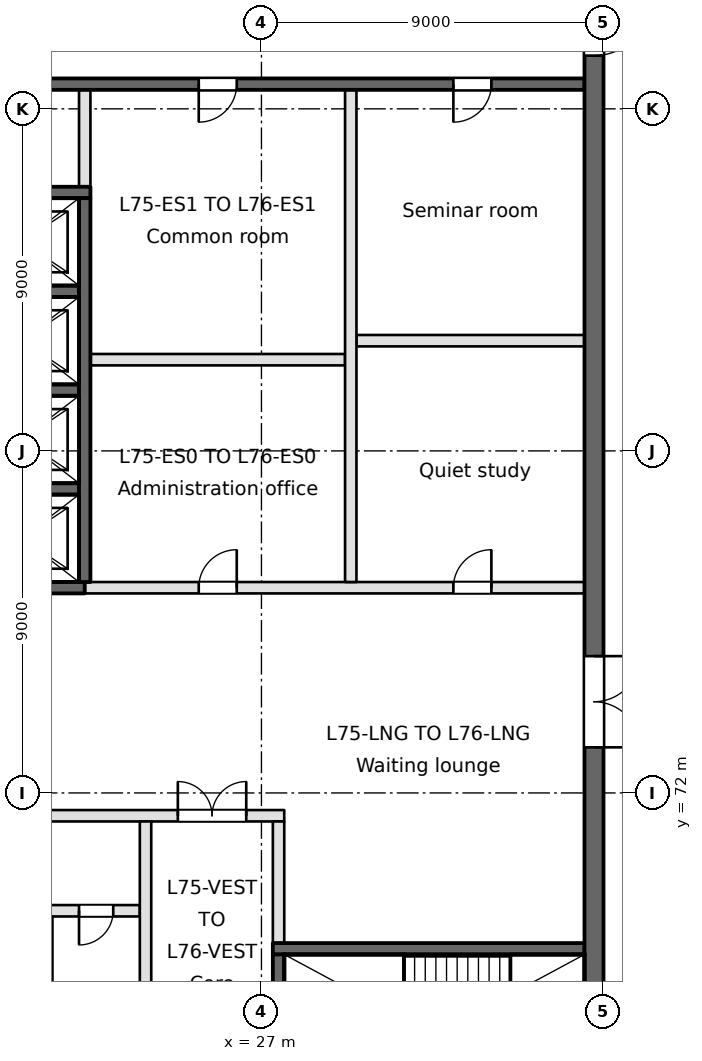
"""IFC4 building model, lengths in metres.
Left out: names, types, materials, properties, quantities, classifications, styles, units other than length and angle.
Written with IfcOpenShell. Run it as: python <this file> out.ifc"""

import sys

from ifc_helpers import new_model, si_unit, direction, frame, frame_2d, origin, place, context, subcontext, project, spatial, rectangle, extrude, element, fill, save


model = new_model("IFC4")
c1 = context("Model", 3, precision=1e-05, world=origin(), true_north=direction((0.0, 1.0)))
c2 = subcontext(c1, "Body", "Model", "MODEL_VIEW")
j1 = project(units=[si_unit("LENGTHUNIT", "METRE"), si_unit("PLANEANGLEUNIT", "RADIAN")], contexts=[c1])
p1 = place(None, origin())
s1 = spatial("IfcSite", under=j1, at=p1, CompositionType="ELEMENT")
p2 = place(p1, origin())
s2 = spatial("IfcBuilding", under=s1, at=p2, CompositionType="ELEMENT")
p3 = place(p2, frame((0.0, 0.0, 291.9)))
s3 = spatial("IfcBuildingStorey", under=s2, at=p3, CompositionType="ELEMENT", Elevation=291.9)
p4 = place(p3, frame((27.3, 67.9, -0.4), z_axis=(0.0, 0.0, 1.0), x_axis=(1.0, 0.0, 0.0)))
e1 = element("IfcWall", 1, at=p4, inside=s3, PredefinedType="SOLIDWALL", context=c2, shape_type="SweptSolid", body=[
    extrude(rectangle(XDim=8.2, YDim=0.3, at=frame_2d((4.1, 0.0))), origin(), (0.0, 0.0, 1.0), 3.7),
])
p5 = place(p3, frame((10.1, 68.9, 0.0), z_axis=(0.0, 0.0, 1.0), x_axis=(1.0, 0.0, 0.0)))
e2 = element("IfcWall", 2, at=p5, inside=s3, PredefinedType="PARTITIONING", context=c2, shape_type="SweptSolid", body=[
    extrude(rectangle(XDim=13.7, YDim=0.3, at=frame_2d((6.85, 0.0))), origin(), (0.0, 0.0, 1.0), 3.3),
])
p6 = place(p5, frame((1.25, 0.0, 0.0)))
e3 = element("IfcOpeningElement", 3, at=p6, cuts=e2, PredefinedType="OPENING", context=c2, shape_type="SweptSolid", body=[
    extrude(rectangle(XDim=0.9, YDim=2.1, at=frame_2d((0.45, 1.05))), frame((0.0, 0.15, 0.0), z_axis=(0.0, -1.0, 0.0), x_axis=(1.0, 0.0, 0.0)), (0.0, 0.0, 1.0), 0.3),
])
p7 = place(p5, frame((5.0, 0.0, 0.0)))
e4 = element("IfcOpeningElement", 4, at=p7, cuts=e2, PredefinedType="OPENING", context=c2, shape_type="SweptSolid", body=[
    extrude(rectangle(XDim=0.9, YDim=2.1, at=frame_2d((0.45, 1.05))), frame((0.0, 0.15, 0.0), z_axis=(0.0, -1.0, 0.0), x_axis=(1.0, 0.0, 0.0)), (0.0, 0.0, 1.0), 0.3),
])
p8 = place(p5, frame((8.8, 0.0, 0.0)))
e5 = element("IfcOpeningElement", 5, at=p8, cuts=e2, PredefinedType="OPENING", context=c2, shape_type="SweptSolid", body=[
    extrude(rectangle(XDim=1.0, YDim=2.1, at=frame_2d((0.5, 1.05))), frame((0.0, 0.15, 0.0), z_axis=(0.0, -1.0, 0.0), x_axis=(1.0, 0.0, 0.0)), (0.0, 0.0, 1.0), 0.3),
])
p9 = place(p5, frame((12.1, 0.0, 0.0)))
e6 = element("IfcOpeningElement", 6, at=p9, cuts=e2, PredefinedType="OPENING", context=c2, shape_type="SweptSolid", body=[
    extrude(rectangle(XDim=0.9, YDim=2.1, at=frame_2d((0.45, 1.05))), frame((0.0, 0.15, 0.0), z_axis=(0.0, -1.0, 0.0), x_axis=(1.0, 0.0, 0.0)), (0.0, 0.0, 1.0), 0.3),
])
p10 = place(p3, frame((9.95, 71.4, 0.0), z_axis=(0.0, 0.0, 1.0), x_axis=(1.0, 0.0, 0.0)))
e7 = element("IfcWall", 7, at=p10, inside=s3, PredefinedType="PARTITIONING", context=c2, shape_type="SweptSolid", body=[
    extrude(rectangle(XDim=17.65, YDim=0.3, at=frame_2d((8.825, 0.0))), origin(), (0.0, 0.0, 1.0), 3.3),
])
p11 = place(p10, frame((14.85, 0.0, 0.0)))
e8 = element("IfcOpeningElement", 8, at=p11, cuts=e7, PredefinedType="OPENING", context=c2, shape_type="SweptSolid", body=[
    extrude(rectangle(XDim=1.8, YDim=2.1, at=frame_2d((0.9, 1.05))), frame((0.0, 0.15, 0.0), z_axis=(0.0, -1.0, 0.0), x_axis=(1.0, 0.0, 0.0)), (0.0, 0.0, 1.0), 0.3),
])
p12 = place(p10, frame((6.4, 0.0, 0.0)))
e9 = element("IfcOpeningElement", 9, at=p12, cuts=e7, PredefinedType="OPENING", context=c2, shape_type="SweptSolid", body=[
    extrude(rectangle(XDim=1.2, YDim=2.1, at=frame_2d((0.6, 1.05))), frame((0.0, 0.15, 0.0), z_axis=(0.0, -1.0, 0.0), x_axis=(1.0, 0.0, 0.0)), (0.0, 0.0, 1.0), 0.3),
])
p13 = place(p3, frame((0.9, 77.4, -0.4), z_axis=(0.0, 0.0, 1.0), x_axis=(1.0, 0.0, 0.0)))
e10 = element("IfcWall", 10, at=p13, inside=s3, PredefinedType="SOLIDWALL", context=c2, shape_type="SweptSolid", body=[
    extrude(rectangle(XDim=21.45, YDim=0.3, at=frame_2d((10.725, 0.0))), origin(), (0.0, 0.0, 1.0), 3.7),
])
p14 = place(p13, frame((15.15, 0.0, 0.4)))
e11 = element("IfcOpeningElement", 11, at=p14, cuts=e10, PredefinedType="OPENING", context=c2, shape_type="SweptSolid", body=[
    extrude(rectangle(XDim=1.8, YDim=2.1, at=frame_2d((0.9, 1.05))), frame((0.0, 0.15, 0.0), z_axis=(0.0, -1.0, 0.0), x_axis=(1.0, 0.0, 0.0)), (0.0, 0.0, 1.0), 0.3),
])
p15 = place(p13, frame((2.35, 0.0, 0.4)))
e12 = element("IfcOpeningElement", 12, at=p15, cuts=e10, PredefinedType="OPENING", context=c2, shape_type="SweptSolid", body=[
    extrude(rectangle(XDim=1.0, YDim=2.1, at=frame_2d((0.5, 1.05))), frame((0.0, 0.15, 0.0), z_axis=(0.0, -1.0, 0.0), x_axis=(1.0, 0.0, 0.0)), (0.0, 0.0, 1.0), 0.3),
])
p16 = place(p13, frame((7.75, 0.0, 0.4)))
e13 = element("IfcOpeningElement", 13, at=p16, cuts=e10, PredefinedType="OPENING", context=c2, shape_type="SweptSolid", body=[
    extrude(rectangle(XDim=1.0, YDim=2.1, at=frame_2d((0.5, 1.05))), frame((0.0, 0.15, 0.0), z_axis=(0.0, -1.0, 0.0), x_axis=(1.0, 0.0, 0.0)), (0.0, 0.0, 1.0), 0.3),
])
p17 = place(p3, frame((22.35, 77.4, 0.0), z_axis=(0.0, 0.0, 1.0), x_axis=(1.0, 0.0, 0.0)))
e14 = element("IfcWall", 14, at=p17, inside=s3, PredefinedType="PARTITIONING", context=c2, shape_type="SweptSolid", body=[
    extrude(rectangle(XDim=13.15, YDim=0.3, at=frame_2d((6.575, 0.0))), origin(), (0.0, 0.0, 1.0), 3.3),
])
p18 = place(p17, frame((3.0, 0.0, 0.0)))
e15 = element("IfcOpeningElement", 15, at=p18, cuts=e14, PredefinedType="OPENING", context=c2, shape_type="SweptSolid", body=[
    extrude(rectangle(XDim=1.0, YDim=2.1, at=frame_2d((0.5, 1.05))), frame((0.0, 0.15, 0.0), z_axis=(0.0, -1.0, 0.0), x_axis=(1.0, 0.0, 0.0)), (0.0, 0.0, 1.0), 0.3),
])
p19 = place(p17, frame((9.7, 0.0, 0.0)))
e16 = element("IfcOpeningElement", 16, at=p19, cuts=e14, PredefinedType="OPENING", context=c2, shape_type="SweptSolid", body=[
    extrude(rectangle(XDim=1.0, YDim=2.1, at=frame_2d((0.5, 1.05))), frame((0.0, 0.15, 0.0), z_axis=(0.0, -1.0, 0.0), x_axis=(1.0, 0.0, 0.0)), (0.0, 0.0, 1.0), 0.3),
])
for number, where, z_axis, x_axis in (
    (17, (19.2, 80.0, -0.4), (0.0, 0.0, 1.0), (1.0, 0.0, 0.0)),
    (18, (19.2, 82.6, -0.4), (0.0, 0.0, 1.0), (1.0, 0.0, 0.0)),
):
    element("IfcWall", number, at=place(p3, frame(where, z_axis=z_axis, x_axis=x_axis)), inside=s3, PredefinedType="SOLIDWALL", context=c2, shape_type="SweptSolid", body=[
        extrude(rectangle(XDim=3.0, YDim=0.3, at=frame_2d((1.5, 0.0))), origin(), (0.0, 0.0, 1.0), 3.7),
    ])
p20 = place(p3, frame((22.5, 83.4, 0.0), z_axis=(0.0, 0.0, 1.0), x_axis=(1.0, 0.0, 0.0)))
e19 = element("IfcWall", 19, at=p20, inside=s3, PredefinedType="PARTITIONING", context=c2, shape_type="SweptSolid", body=[
    extrude(rectangle(XDim=6.7, YDim=0.3, at=frame_2d((3.35, 0.0))), origin(), (0.0, 0.0, 1.0), 3.3),
])
p21 = place(p3, frame((29.5, 83.9, 0.0), z_axis=(0.0, 0.0, 1.0), x_axis=(1.0, 0.0, 0.0)))
e20 = element("IfcWall", 20, at=p21, inside=s3, PredefinedType="PARTITIONING", context=c2, shape_type="SweptSolid", body=[
    extrude(rectangle(XDim=6.0, YDim=0.3, at=frame_2d((3.0, 0.0))), origin(), (0.0, 0.0, 1.0), 3.3),
])
p22 = place(p3, frame((19.2, 85.2, -0.4), z_axis=(0.0, 0.0, 1.0), x_axis=(1.0, 0.0, 0.0)))
e21 = element("IfcWall", 21, at=p22, inside=s3, PredefinedType="SOLIDWALL", context=c2, shape_type="SweptSolid", body=[
    extrude(rectangle(XDim=3.0, YDim=0.3, at=frame_2d((1.5, 0.0))), origin(), (0.0, 0.0, 1.0), 3.7),
])
p23 = place(p3, frame((11.4, 87.8, -0.4), z_axis=(0.0, 0.0, 1.0), x_axis=(1.0, 0.0, 0.0)))
e22 = element("IfcWall", 22, at=p23, inside=s3, PredefinedType="SOLIDWALL", context=c2, shape_type="SweptSolid", body=[
    extrude(rectangle(XDim=11.1, YDim=0.3, at=frame_2d((5.55, 0.0))), origin(), (0.0, 0.0, 1.0), 3.7),
])
p24 = place(p3, frame((0.9, 90.65, -0.4), z_axis=(0.0, 0.0, 1.0), x_axis=(1.0, 0.0, 0.0)))
e23 = element("IfcWall", 23, at=p24, inside=s3, PredefinedType="SOLIDWALL", context=c2, shape_type="SweptSolid", body=[
    extrude(rectangle(XDim=34.6, YDim=0.3, at=frame_2d((17.3, 0.0))), origin(), (0.0, 0.0, 1.0), 3.7),
])
p25 = place(p24, frame((15.55, 0.0, 0.4)))
e24 = element("IfcOpeningElement", 24, at=p25, cuts=e23, PredefinedType="OPENING", context=c2, shape_type="SweptSolid", body=[
    extrude(rectangle(XDim=1.0, YDim=2.1, at=frame_2d((0.5, 1.05))), frame((0.0, 0.15, 0.0), z_axis=(0.0, -1.0, 0.0), x_axis=(1.0, 0.0, 0.0)), (0.0, 0.0, 1.0), 0.3),
])
p26 = place(p24, frame((2.35, 0.0, 0.4)))
e25 = element("IfcOpeningElement", 25, at=p26, cuts=e23, PredefinedType="OPENING", context=c2, shape_type="SweptSolid", body=[
    extrude(rectangle(XDim=1.0, YDim=2.1, at=frame_2d((0.5, 1.05))), frame((0.0, 0.15, 0.0), z_axis=(0.0, -1.0, 0.0), x_axis=(1.0, 0.0, 0.0)), (0.0, 0.0, 1.0), 0.3),
])
p27 = place(p24, frame((7.75, 0.0, 0.4)))
e26 = element("IfcOpeningElement", 26, at=p27, cuts=e23, PredefinedType="OPENING", context=c2, shape_type="SweptSolid", body=[
    extrude(rectangle(XDim=1.0, YDim=2.1, at=frame_2d((0.5, 1.05))), frame((0.0, 0.15, 0.0), z_axis=(0.0, -1.0, 0.0), x_axis=(1.0, 0.0, 0.0)), (0.0, 0.0, 1.0), 0.3),
])
p28 = place(p24, frame((24.45, 0.0, 0.4)))
e27 = element("IfcOpeningElement", 27, at=p28, cuts=e23, PredefinedType="OPENING", context=c2, shape_type="SweptSolid", body=[
    extrude(rectangle(XDim=1.0, YDim=2.1, at=frame_2d((0.5, 1.05))), frame((0.0, 0.15, 0.0), z_axis=(0.0, -1.0, 0.0), x_axis=(1.0, 0.0, 0.0)), (0.0, 0.0, 1.0), 0.3),
])
p29 = place(p24, frame((31.15, 0.0, 0.4)))
e28 = element("IfcOpeningElement", 28, at=p29, cuts=e23, PredefinedType="OPENING", context=c2, shape_type="SweptSolid", body=[
    extrude(rectangle(XDim=1.0, YDim=2.1, at=frame_2d((0.5, 1.05))), frame((0.0, 0.15, 0.0), z_axis=(0.0, -1.0, 0.0), x_axis=(1.0, 0.0, 0.0)), (0.0, 0.0, 1.0), 0.3),
])
p30 = place(p3, frame((21.35, 63.5, 0.0), z_axis=(0.0, 0.0, 1.0), x_axis=(0.0, 1.0, 0.0)))
e29 = element("IfcWall", 29, at=p30, inside=s3, PredefinedType="PARTITIONING", context=c2, shape_type="SweptSolid", body=[
    extrude(rectangle(XDim=5.25, YDim=0.3, at=frame_2d((2.625, 0.0))), origin(), (0.0, 0.0, 1.0), 3.3),
])
p31 = place(p3, frame((22.35, 77.55, -0.4), z_axis=(0.0, 0.0, 1.0), x_axis=(0.0, 1.0, 0.0)))
e30 = element("IfcWall", 30, at=p31, inside=s3, PredefinedType="SOLIDWALL", context=c2, shape_type="SweptSolid", body=[
    extrude(rectangle(XDim=10.1, YDim=0.3, at=frame_2d((5.05, 0.0))), origin(), (0.0, 0.0, 1.0), 3.7),
])
p32 = place(p3, frame((22.35, 87.95, 0.0), z_axis=(0.0, 0.0, 1.0), x_axis=(0.0, 1.0, 0.0)))
e31 = element("IfcWall", 31, at=p32, inside=s3, PredefinedType="PARTITIONING", context=c2, shape_type="SweptSolid", body=[
    extrude(rectangle(XDim=2.55, YDim=0.3, at=frame_2d((1.275, 0.0))), origin(), (0.0, 0.0, 1.0), 3.3),
])
p33 = place(p3, frame((23.95, 63.5, 0.0), z_axis=(0.0, 0.0, 1.0), x_axis=(0.0, 1.0, 0.0)))
e32 = element("IfcWall", 32, at=p33, inside=s3, PredefinedType="PARTITIONING", context=c2, shape_type="SweptSolid", body=[
    extrude(rectangle(XDim=7.75, YDim=0.3, at=frame_2d((3.875, 0.0))), origin(), (0.0, 0.0, 1.0), 3.3),
])
p34 = place(p3, frame((27.45, 63.5, -0.4), z_axis=(0.0, 0.0, 1.0), x_axis=(0.0, 1.0, 0.0)))
e33 = element("IfcWall", 33, at=p34, inside=s3, PredefinedType="SOLIDWALL", context=c2, shape_type="SweptSolid", body=[
    extrude(rectangle(XDim=4.25, YDim=0.3, at=frame_2d((2.125, 0.0))), origin(), (0.0, 0.0, 1.0), 3.7),
])
p35 = place(p3, frame((27.45, 68.05, 0.0), z_axis=(0.0, 0.0, 1.0), x_axis=(0.0, 1.0, 0.0)))
e34 = element("IfcWall", 34, at=p35, inside=s3, PredefinedType="PARTITIONING", context=c2, shape_type="SweptSolid", body=[
    extrude(rectangle(XDim=3.2, YDim=0.3, at=frame_2d((1.6, 0.0))), origin(), (0.0, 0.0, 1.0), 3.3),
])
p36 = place(p3, frame((29.35, 77.55, 0.0), z_axis=(0.0, 0.0, 1.0), x_axis=(0.0, 1.0, 0.0)))
e35 = element("IfcWall", 35, at=p36, inside=s3, PredefinedType="PARTITIONING", context=c2, shape_type="SweptSolid", body=[
    extrude(rectangle(XDim=12.95, YDim=0.3, at=frame_2d((6.475, 0.0))), origin(), (0.0, 0.0, 1.0), 3.3),
])
p37 = place(p3, frame((35.75, 63.5, -0.4), z_axis=(0.0, 0.0, 1.0), x_axis=(0.0, 1.0, 0.0)))
e36 = element("IfcWall", 36, at=p37, inside=s3, PredefinedType="SOLIDWALL", context=c2, shape_type="SweptSolid", body=[
    extrude(rectangle(XDim=34.6, YDim=0.5, at=frame_2d((17.3, 0.0))), origin(), (0.0, 0.0, 1.0), 3.7),
])
p38 = place(p37, frame((9.7, 0.0, 0.4)))
e37 = element("IfcOpeningElement", 37, at=p38, cuts=e36, PredefinedType="OPENING", context=c2, shape_type="SweptSolid", body=[
    extrude(rectangle(XDim=2.4, YDim=2.1, at=frame_2d((1.2, 1.05))), frame((0.0, 0.25, 0.0), z_axis=(0.0, -1.0, 0.0), x_axis=(1.0, 0.0, 0.0)), (0.0, 0.0, 1.0), 0.5),
])
p39 = place(p37, frame((27.9, 0.0, 0.4)))
e38 = element("IfcOpeningElement", 38, at=p39, cuts=e36, PredefinedType="OPENING", context=c2, shape_type="SweptSolid", body=[
    extrude(rectangle(XDim=1.5, YDim=2.1, at=frame_2d((0.75, 1.05))), frame((0.0, 0.25, 0.0), z_axis=(0.0, -1.0, 0.0), x_axis=(1.0, 0.0, 0.0)), (0.0, 0.0, 1.0), 0.5),
])
p40 = place(p37, frame((1.5, 0.0, 0.4)))
e39 = element("IfcOpeningElement", 39, at=p40, cuts=e36, PredefinedType="OPENING", context=c2, shape_type="SweptSolid", body=[
    extrude(rectangle(XDim=1.2, YDim=2.1, at=frame_2d((0.6, 1.05))), frame((0.0, 0.25, 0.0), z_axis=(0.0, -1.0, 0.0), x_axis=(1.0, 0.0, 0.0)), (0.0, 0.0, 1.0), 0.5),
])
p41 = place(p38, frame((2.4, 0.0, 0.0), z_axis=(0.0, 0.0, 1.0), x_axis=(-1.0, 0.0, 0.0)))
e40 = element("IfcDoor", 40, at=p41, inside=s3, OperationType="DOUBLE_DOOR_SINGLE_SWING", PredefinedType="DOOR", context=c2, shape_type="SweptSolid", body=[
    extrude(rectangle(XDim=2.4, YDim=2.1, at=frame_2d((1.2, 1.05))), frame((0.0, 0.025, 0.0), z_axis=(0.0, -1.0, 0.0), x_axis=(1.0, 0.0, 0.0)), (0.0, 0.0, 1.0), 0.05),
])
fill(e37, e40)
p42 = place(p39, frame((1.5, 0.0, 0.0), z_axis=(0.0, 0.0, 1.0), x_axis=(-1.0, 0.0, 0.0)))
e41 = element("IfcDoor", 41, at=p42, inside=s3, OperationType="SINGLE_SWING_LEFT", PredefinedType="DOOR", context=c2, shape_type="SweptSolid", body=[
    extrude(rectangle(XDim=1.5, YDim=2.1, at=frame_2d((0.75, 1.05))), frame((0.0, 0.025, 0.0), z_axis=(0.0, -1.0, 0.0), x_axis=(1.0, 0.0, 0.0)), (0.0, 0.0, 1.0), 0.05),
])
fill(e38, e41)
p43 = place(p11, origin())
e42 = element("IfcDoor", 42, at=p43, inside=s3, OperationType="DOUBLE_DOOR_SINGLE_SWING", PredefinedType="DOOR", context=c2, shape_type="SweptSolid", body=[
    extrude(rectangle(XDim=1.8, YDim=2.1, at=frame_2d((0.9, 1.05))), frame((0.0, 0.025, 0.0), z_axis=(0.0, -1.0, 0.0), x_axis=(1.0, 0.0, 0.0)), (0.0, 0.0, 1.0), 0.05),
])
fill(e8, e42)
p44 = place(p9, frame((0.9, 0.0, 0.0), z_axis=(0.0, 0.0, 1.0), x_axis=(-1.0, 0.0, 0.0)))
e43 = element("IfcDoor", 43, at=p44, inside=s3, OperationType="SINGLE_SWING_RIGHT", PredefinedType="DOOR", context=c2, shape_type="SweptSolid", body=[
    extrude(rectangle(XDim=0.9, YDim=2.1, at=frame_2d((0.45, 1.05))), frame((0.0, 0.025, 0.0), z_axis=(0.0, -1.0, 0.0), x_axis=(1.0, 0.0, 0.0)), (0.0, 0.0, 1.0), 0.05),
])
fill(e6, e43)
p45 = place(p18, origin())
e44 = element("IfcDoor", 44, at=p45, inside=s3, OperationType="SINGLE_SWING_RIGHT", PredefinedType="DOOR", context=c2, shape_type="SweptSolid", body=[
    extrude(rectangle(XDim=1.0, YDim=2.1, at=frame_2d((0.5, 1.05))), frame((0.0, 0.025, 0.0), z_axis=(0.0, -1.0, 0.0), x_axis=(1.0, 0.0, 0.0)), (0.0, 0.0, 1.0), 0.05),
])
fill(e15, e44)
p46 = place(p28, frame((1.0, 0.0, 0.0), z_axis=(0.0, 0.0, 1.0), x_axis=(-1.0, 0.0, 0.0)))
e45 = element("IfcDoor", 45, at=p46, inside=s3, OperationType="SINGLE_SWING_RIGHT", PredefinedType="DOOR", context=c2, shape_type="SweptSolid", body=[
    extrude(rectangle(XDim=1.0, YDim=2.1, at=frame_2d((0.5, 1.05))), frame((0.0, 0.025, 0.0), z_axis=(0.0, -1.0, 0.0), x_axis=(1.0, 0.0, 0.0)), (0.0, 0.0, 1.0), 0.05),
])
fill(e27, e45)
p47 = place(p19, origin())
e46 = element("IfcDoor", 46, at=p47, inside=s3, OperationType="SINGLE_SWING_RIGHT", PredefinedType="DOOR", context=c2, shape_type="SweptSolid", body=[
    extrude(rectangle(XDim=1.0, YDim=2.1, at=frame_2d((0.5, 1.05))), frame((0.0, 0.025, 0.0), z_axis=(0.0, -1.0, 0.0), x_axis=(1.0, 0.0, 0.0)), (0.0, 0.0, 1.0), 0.05),
])
fill(e16, e46)
p48 = place(p29, frame((1.0, 0.0, 0.0), z_axis=(0.0, 0.0, 1.0), x_axis=(-1.0, 0.0, 0.0)))
e47 = element("IfcDoor", 47, at=p48, inside=s3, OperationType="SINGLE_SWING_RIGHT", PredefinedType="DOOR", context=c2, shape_type="SweptSolid", body=[
    extrude(rectangle(XDim=1.0, YDim=2.1, at=frame_2d((0.5, 1.05))), frame((0.0, 0.025, 0.0), z_axis=(0.0, -1.0, 0.0), x_axis=(1.0, 0.0, 0.0)), (0.0, 0.0, 1.0), 0.05),
])
fill(e28, e47)
save(model, sys.argv[1])
